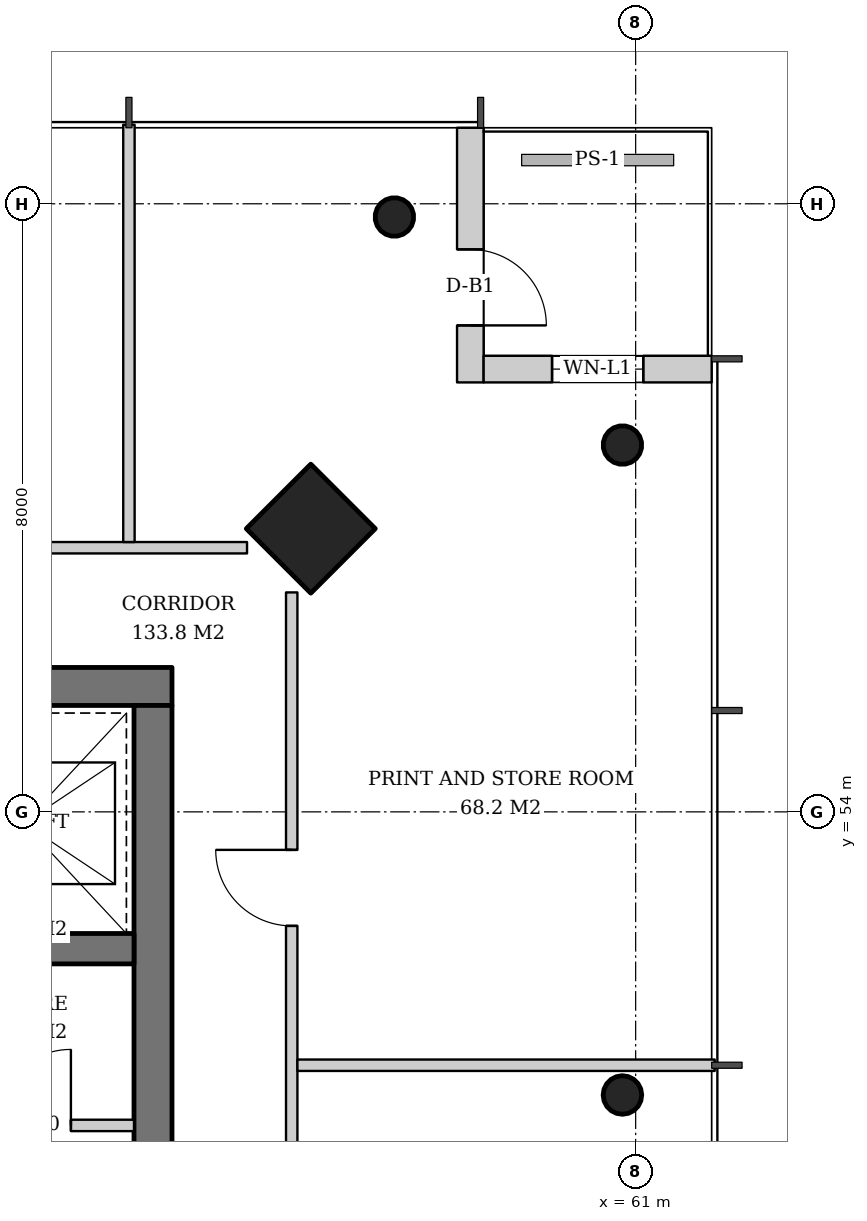
"""IFC4 building model, lengths in metres.
Left out: names, types, materials, properties, quantities, classifications, styles, units other than length and angle.
Written with IfcOpenShell. Run it as: python <this file> out.ifc"""

import sys

from ifc_helpers import new_model, si_unit, direction, frame, frame_2d, origin, origin_2d, place, context, subcontext, project, spatial, rectangle, hollow_circle, extrude, element, fill, save


model = new_model("IFC4")
c1 = context("Model", 3, precision=1e-05, world=origin(), true_north=direction((0.0, 1.0)))
c2 = subcontext(c1, "Body", "Model", "MODEL_VIEW")
j1 = project(units=[si_unit("LENGTHUNIT", "METRE"), si_unit("PLANEANGLEUNIT", "RADIAN")], contexts=[c1])
p1 = place(None, origin())
s1 = spatial("IfcSite", under=j1, at=p1, CompositionType="ELEMENT")
p2 = place(p1, origin())
s2 = spatial("IfcBuilding", under=s1, at=p2, CompositionType="ELEMENT")
p3 = place(p2, frame((0.0, 0.0, 275.6)))
s3 = spatial("IfcBuildingStorey", under=s2, at=p3, CompositionType="ELEMENT", Elevation=275.6)
p4 = place(p3, frame((56.764, 57.764, 0.0), z_axis=(-0.031964207655, -0.031964207655, 0.998977766949), x_axis=(0.707106781187, -0.707106781187, 0.0)))
e1 = element("IfcColumn", 1, at=p4, inside=s3, PredefinedType="COLUMN", context=c2, shape_type="SweptSolid", body=[
    extrude(rectangle(XDim=1.2, YDim=1.2, at=origin_2d()), origin(), (0.0, 0.0, 1.0), 3.804),
])
p5 = place(p3, frame((60.864, 58.864, 0.0), z_axis=(-0.031900153262, -0.031900153262, 0.998981861919), x_axis=(0.707106781187, -0.707106781187, 0.0)))
e2 = element("IfcColumn", 2, at=p5, inside=s3, PredefinedType="COLUMN", context=c2, shape_type="SweptSolid", body=[
    extrude(hollow_circle(Radius=0.254, WallThickness=0.02, at=origin_2d()), origin(), (0.0, 0.0, 1.0), 3.804),
])
p6 = place(p3, frame((60.864, 50.288, 0.0), z_axis=(-0.031914583439, -0.010659599298, 0.999433755837), x_axis=(0.316800238982, -0.948492281772, 0.0)))
e3 = element("IfcColumn", 3, at=p6, inside=s3, PredefinedType="COLUMN", context=c2, shape_type="SweptSolid", body=[
    extrude(hollow_circle(Radius=0.254, WallThickness=0.02, at=origin_2d()), origin(), (0.0, 0.0, 1.0), 3.802),
])
p7 = place(p3, frame((57.864, 61.864, 0.0), z_axis=(-0.031900153262, -0.031900153262, 0.998981861919), x_axis=(0.707106781187, -0.707106781187, 0.0)))
e4 = element("IfcColumn", 4, at=p7, inside=s3, PredefinedType="COLUMN", context=c2, shape_type="SweptSolid", body=[
    extrude(hollow_circle(Radius=0.254, WallThickness=0.02, at=origin_2d()), origin(), (0.0, 0.0, 1.0), 3.804),
])
p8 = place(p3, frame((35.1, 55.65, 0.0), z_axis=(0.0, 0.0, 1.0), x_axis=(1.0, 0.0, 0.0)))
e5 = element("IfcWall", 5, at=p8, inside=s3, PredefinedType="SHEAR", context=c2, shape_type="SweptSolid", body=[
    extrude(rectangle(XDim=19.8, YDim=0.5, at=frame_2d((9.9, 0.0))), origin(), (0.0, 0.0, 1.0), 3.8),
])
p9 = place(p8, frame((14.54, 0.0, 0.0)))
e6 = element("IfcOpeningElement", 6, at=p9, cuts=e5, PredefinedType="OPENING", context=c2, shape_type="SweptSolid", body=[
    extrude(rectangle(XDim=1.0, YDim=2.1, at=frame_2d((0.5, 1.05))), frame((0.0, 0.26, 0.0), z_axis=(0.0, -1.0, 0.0), x_axis=(1.0, 0.0, 0.0)), (0.0, 0.0, 1.0), 0.52),
])
p10 = place(p8, frame((1.625, 0.0, 0.0)))
e7 = element("IfcOpeningElement", 7, at=p10, cuts=e5, PredefinedType="OPENING", context=c2, shape_type="SweptSolid", body=[
    extrude(rectangle(XDim=1.0, YDim=2.1, at=frame_2d((0.5, 1.05))), frame((0.0, 0.26, 0.0), z_axis=(0.0, -1.0, 0.0), x_axis=(1.0, 0.0, 0.0)), (0.0, 0.0, 1.0), 0.52),
])
p11 = place(p8, frame((3.562, 0.0, 0.0)))
e8 = element("IfcOpeningElement", 8, at=p11, cuts=e5, PredefinedType="OPENING", context=c2, shape_type="SweptSolid", body=[
    extrude(rectangle(XDim=1.0, YDim=2.1, at=frame_2d((0.5, 1.05))), frame((0.0, 0.26, 0.0), z_axis=(0.0, -1.0, 0.0), x_axis=(1.0, 0.0, 0.0)), (0.0, 0.0, 1.0), 0.52),
])
p12 = place(p3, frame((54.65, 36.6, 0.0), z_axis=(0.0, 0.0, 1.0), x_axis=(0.0, 1.0, 0.0)))
e9 = element("IfcWall", 9, at=p12, inside=s3, PredefinedType="SHEAR", context=c2, shape_type="SweptSolid", body=[
    extrude(rectangle(XDim=18.8, YDim=0.5, at=frame_2d((9.4, 0.0))), origin(), (0.0, 0.0, 1.0), 3.8),
])
p13 = place(p12, frame((8.5, 0.0, 0.0)))
e10 = element("IfcOpeningElement", 10, at=p13, cuts=e9, PredefinedType="OPENING", context=c2, shape_type="SweptSolid", body=[
    extrude(rectangle(XDim=1.8, YDim=2.4, at=frame_2d((0.9, 1.2))), frame((0.0, 0.26, 0.0), z_axis=(0.0, -1.0, 0.0), x_axis=(1.0, 0.0, 0.0)), (0.0, 0.0, 1.0), 0.52),
])
p14 = place(p3, frame((35.6, 52.2, 0.0), z_axis=(0.0, 0.0, 1.0), x_axis=(1.0, 0.0, 0.0)))
e11 = element("IfcWall", 11, at=p14, inside=s3, PredefinedType="SHEAR", context=c2, shape_type="SweptSolid", body=[
    extrude(rectangle(XDim=18.8, YDim=0.4, at=frame_2d((9.4, 0.0))), origin(), (0.0, 0.0, 1.0), 3.8),
])
p15 = place(p3, frame((58.825, 63.0, 0.0), z_axis=(0.0, 0.0, 1.0), x_axis=(0.0, -1.0, 0.0)))
e12 = element("IfcWall", 12, at=p15, inside=s3, PredefinedType="SOLIDWALL", context=c2, shape_type="SweptSolid", body=[
    extrude(rectangle(XDim=3.35, YDim=0.35, at=frame_2d((1.675, 0.0))), origin(), (0.0, 0.0, 1.0), 3.62),
])
p16 = place(p15, frame((1.6, 0.0, 0.0)))
e13 = element("IfcOpeningElement", 13, at=p16, cuts=e12, PredefinedType="OPENING", context=c2, shape_type="SweptSolid", body=[
    extrude(rectangle(XDim=1.0, YDim=2.4, at=frame_2d((0.5, 1.2))), frame((0.0, 0.185, 0.0), z_axis=(0.0, -1.0, 0.0), x_axis=(1.0, 0.0, 0.0)), (0.0, 0.0, 1.0), 0.37),
])
p17 = place(p3, frame((59.0, 59.825, 0.0), z_axis=(0.0, 0.0, 1.0), x_axis=(1.0, 0.0, 0.0)))
e14 = element("IfcWall", 14, at=p17, inside=s3, PredefinedType="SOLIDWALL", context=c2, shape_type="SweptSolid", body=[
    extrude(rectangle(XDim=3.0, YDim=0.35, at=frame_2d((1.5, 0.0))), origin(), (0.0, 0.0, 1.0), 3.62),
])
p18 = place(p17, frame((0.9, 0.0, 0.6)))
e15 = element("IfcOpeningElement", 15, at=p18, cuts=e14, PredefinedType="OPENING", context=c2, shape_type="SweptSolid", body=[
    extrude(rectangle(XDim=1.2, YDim=2.55, at=frame_2d((0.6, 1.275))), frame((0.0, 0.185, 0.0), z_axis=(0.0, -1.0, 0.0), x_axis=(1.0, 0.0, 0.0)), (0.0, 0.0, 1.0), 0.37),
])
p19 = place(p3, frame((51.74, 49.875, 0.0), z_axis=(0.0, 0.0, 1.0), x_axis=(1.0, 0.0, 0.0)))
e16 = element("IfcWall", 16, at=p19, inside=s3, PredefinedType="SOLIDWALL", context=c2, shape_type="SweptSolid", body=[
    extrude(rectangle(XDim=2.66, YDim=0.15, at=frame_2d((1.33, 0.0))), origin(), (0.0, 0.0, 1.0), 3.62),
])
p20 = place(p19, frame((0.83, 0.0, 0.0)))
e17 = element("IfcOpeningElement", 17, at=p20, cuts=e16, PredefinedType="OPENING", context=c2, shape_type="SweptSolid", body=[
    extrude(rectangle(XDim=1.0, YDim=2.1, at=frame_2d((0.5, 1.05))), frame((0.0, 0.085, 0.0), z_axis=(0.0, -1.0, 0.0), x_axis=(1.0, 0.0, 0.0)), (0.0, 0.0, 1.0), 0.17),
])
p21 = place(p3, frame((56.475, 35.113, 0.0), z_axis=(0.0, 0.0, 1.0), x_axis=(0.0, 1.0, 0.0)))
e18 = element("IfcWall", 18, at=p21, inside=s3, PredefinedType="PARTITIONING", context=c2, shape_type="SweptSolid", body=[
    extrude(rectangle(XDim=21.774, YDim=0.15, at=frame_2d((10.887, 0.0))), origin(), (0.0, 0.0, 1.0), 2.867),
])
p22 = place(p21, frame((3.387, 0.0, 0.0)))
e19 = element("IfcOpeningElement", 19, at=p22, cuts=e18, PredefinedType="OPENING", context=c2, shape_type="SweptSolid", body=[
    extrude(rectangle(XDim=1.0, YDim=2.1, at=frame_2d((0.5, 1.05))), frame((0.0, 0.085, 0.0), z_axis=(0.0, -1.0, 0.0), x_axis=(1.0, 0.0, 0.0)), (0.0, 0.0, 1.0), 0.17),
])
p23 = place(p21, frame((8.054, 0.0, 0.0)))
e20 = element("IfcOpeningElement", 20, at=p23, cuts=e18, PredefinedType="OPENING", context=c2, shape_type="SweptSolid", body=[
    extrude(rectangle(XDim=1.0, YDim=2.1, at=frame_2d((0.5, 1.05))), frame((0.0, 0.085, 0.0), z_axis=(0.0, -1.0, 0.0), x_axis=(1.0, 0.0, 0.0)), (0.0, 0.0, 1.0), 0.17),
])
p24 = place(p21, frame((12.72, 0.0, 0.0)))
e21 = element("IfcOpeningElement", 21, at=p24, cuts=e18, PredefinedType="OPENING", context=c2, shape_type="SweptSolid", body=[
    extrude(rectangle(XDim=1.0, YDim=2.1, at=frame_2d((0.5, 1.05))), frame((0.0, 0.085, 0.0), z_axis=(0.0, -1.0, 0.0), x_axis=(1.0, 0.0, 0.0)), (0.0, 0.0, 1.0), 0.17),
])
p25 = place(p21, frame((17.387, 0.0, 0.0)))
e22 = element("IfcOpeningElement", 22, at=p25, cuts=e18, PredefinedType="OPENING", context=c2, shape_type="SweptSolid", body=[
    extrude(rectangle(XDim=1.0, YDim=2.1, at=frame_2d((0.5, 1.05))), frame((0.0, 0.085, 0.0), z_axis=(0.0, -1.0, 0.0), x_axis=(1.0, 0.0, 0.0)), (0.0, 0.0, 1.0), 0.17),
])
p26 = place(p3, frame((56.55, 50.667, 0.0), z_axis=(0.0, 0.0, 1.0), x_axis=(1.0, 0.0, 0.0)))
e23 = element("IfcWall", 23, at=p26, inside=s3, PredefinedType="PARTITIONING", context=c2, shape_type="SweptSolid", body=[
    extrude(rectangle(XDim=5.49, YDim=0.15, at=frame_2d((2.745, 0.0))), origin(), (0.0, 0.0, 1.0), 3.12),
])
p27 = place(p3, frame((55.887, 57.475, 0.0), z_axis=(0.0, 0.0, 1.0), x_axis=(-1.0, 0.0, 0.0)))
e24 = element("IfcWall", 24, at=p27, inside=s3, PredefinedType="PARTITIONING", context=c2, shape_type="SweptSolid", body=[
    extrude(rectangle(XDim=21.774, YDim=0.15, at=frame_2d((10.887, 0.0))), origin(), (0.0, 0.0, 1.0), 2.867),
])
p28 = place(p27, frame((3.387, 0.0, 0.0)))
e25 = element("IfcOpeningElement", 25, at=p28, cuts=e24, PredefinedType="OPENING", context=c2, shape_type="SweptSolid", body=[
    extrude(rectangle(XDim=1.0, YDim=2.1, at=frame_2d((0.5, 1.05))), frame((0.0, 0.085, 0.0), z_axis=(0.0, -1.0, 0.0), x_axis=(1.0, 0.0, 0.0)), (0.0, 0.0, 1.0), 0.17),
])
p29 = place(p27, frame((7.654, 0.0, 0.0)))
e26 = element("IfcOpeningElement", 26, at=p29, cuts=e24, PredefinedType="OPENING", context=c2, shape_type="SweptSolid", body=[
    extrude(rectangle(XDim=1.8, YDim=2.4, at=frame_2d((0.9, 1.2))), frame((0.0, 0.085, 0.0), z_axis=(0.0, -1.0, 0.0), x_axis=(1.0, 0.0, 0.0)), (0.0, 0.0, 1.0), 0.17),
])
p30 = place(p27, frame((17.387, 0.0, 0.0)))
e27 = element("IfcOpeningElement", 27, at=p30, cuts=e24, PredefinedType="OPENING", context=c2, shape_type="SweptSolid", body=[
    extrude(rectangle(XDim=1.0, YDim=2.1, at=frame_2d((0.5, 1.05))), frame((0.0, 0.085, 0.0), z_axis=(0.0, -1.0, 0.0), x_axis=(1.0, 0.0, 0.0)), (0.0, 0.0, 1.0), 0.17),
])
p31 = place(p3, frame((54.333, 57.55, 0.0), z_axis=(0.0, 0.0, 1.0), x_axis=(0.0, 1.0, 0.0)))
e28 = element("IfcWall", 28, at=p31, inside=s3, PredefinedType="PARTITIONING", context=c2, shape_type="SweptSolid", body=[
    extrude(rectangle(XDim=5.49, YDim=0.15, at=frame_2d((2.745, 0.0))), origin(), (0.0, 0.0, 1.0), 3.12),
])
p32 = place(p16, origin())
e29 = element("IfcDoor", 29, at=p32, inside=s3, OperationType="SINGLE_SWING_RIGHT", PredefinedType="DOOR", context=c2, shape_type="SweptSolid", body=[
    extrude(rectangle(XDim=1.0, YDim=2.4, at=frame_2d((0.5, 1.2))), frame((0.0, 0.025, 0.0), z_axis=(0.0, -1.0, 0.0), x_axis=(1.0, 0.0, 0.0)), (0.0, 0.0, 1.0), 0.05),
])
fill(e13, e29)
p33 = place(p18, origin())
e30 = element("IfcWindow", 30, at=p33, inside=s3, PartitioningType="SINGLE_PANEL", PredefinedType="WINDOW", context=c2, shape_type="SweptSolid", body=[
    extrude(rectangle(XDim=1.2, YDim=2.55, at=frame_2d((0.6, 1.275))), frame((0.0, 0.03, 0.0), z_axis=(0.0, -1.0, 0.0), x_axis=(1.0, 0.0, 0.0)), (0.0, 0.0, 1.0), 0.06),
])
fill(e15, e30)
p34 = place(p20, origin())
e31 = element("IfcDoor", 31, at=p34, inside=s3, OperationType="SINGLE_SWING_RIGHT", PredefinedType="DOOR", context=c2, shape_type="SweptSolid", body=[
    extrude(rectangle(XDim=1.0, YDim=2.1, at=frame_2d((0.5, 1.05))), frame((0.0, 0.025, 0.0), z_axis=(0.0, -1.0, 0.0), x_axis=(1.0, 0.0, 0.0)), (0.0, 0.0, 1.0), 0.05),
])
fill(e17, e31)
p35 = place(p25, origin())
e32 = element("IfcDoor", 32, at=p35, inside=s3, OperationType="SINGLE_SWING_RIGHT", PredefinedType="DOOR", context=c2, shape_type="SweptSolid", body=[
    extrude(rectangle(XDim=1.0, YDim=2.1, at=frame_2d((0.5, 1.05))), frame((0.0, 0.025, 0.0), z_axis=(0.0, -1.0, 0.0), x_axis=(1.0, 0.0, 0.0)), (0.0, 0.0, 1.0), 0.05),
])
fill(e22, e32)
save(model, sys.argv[1])
